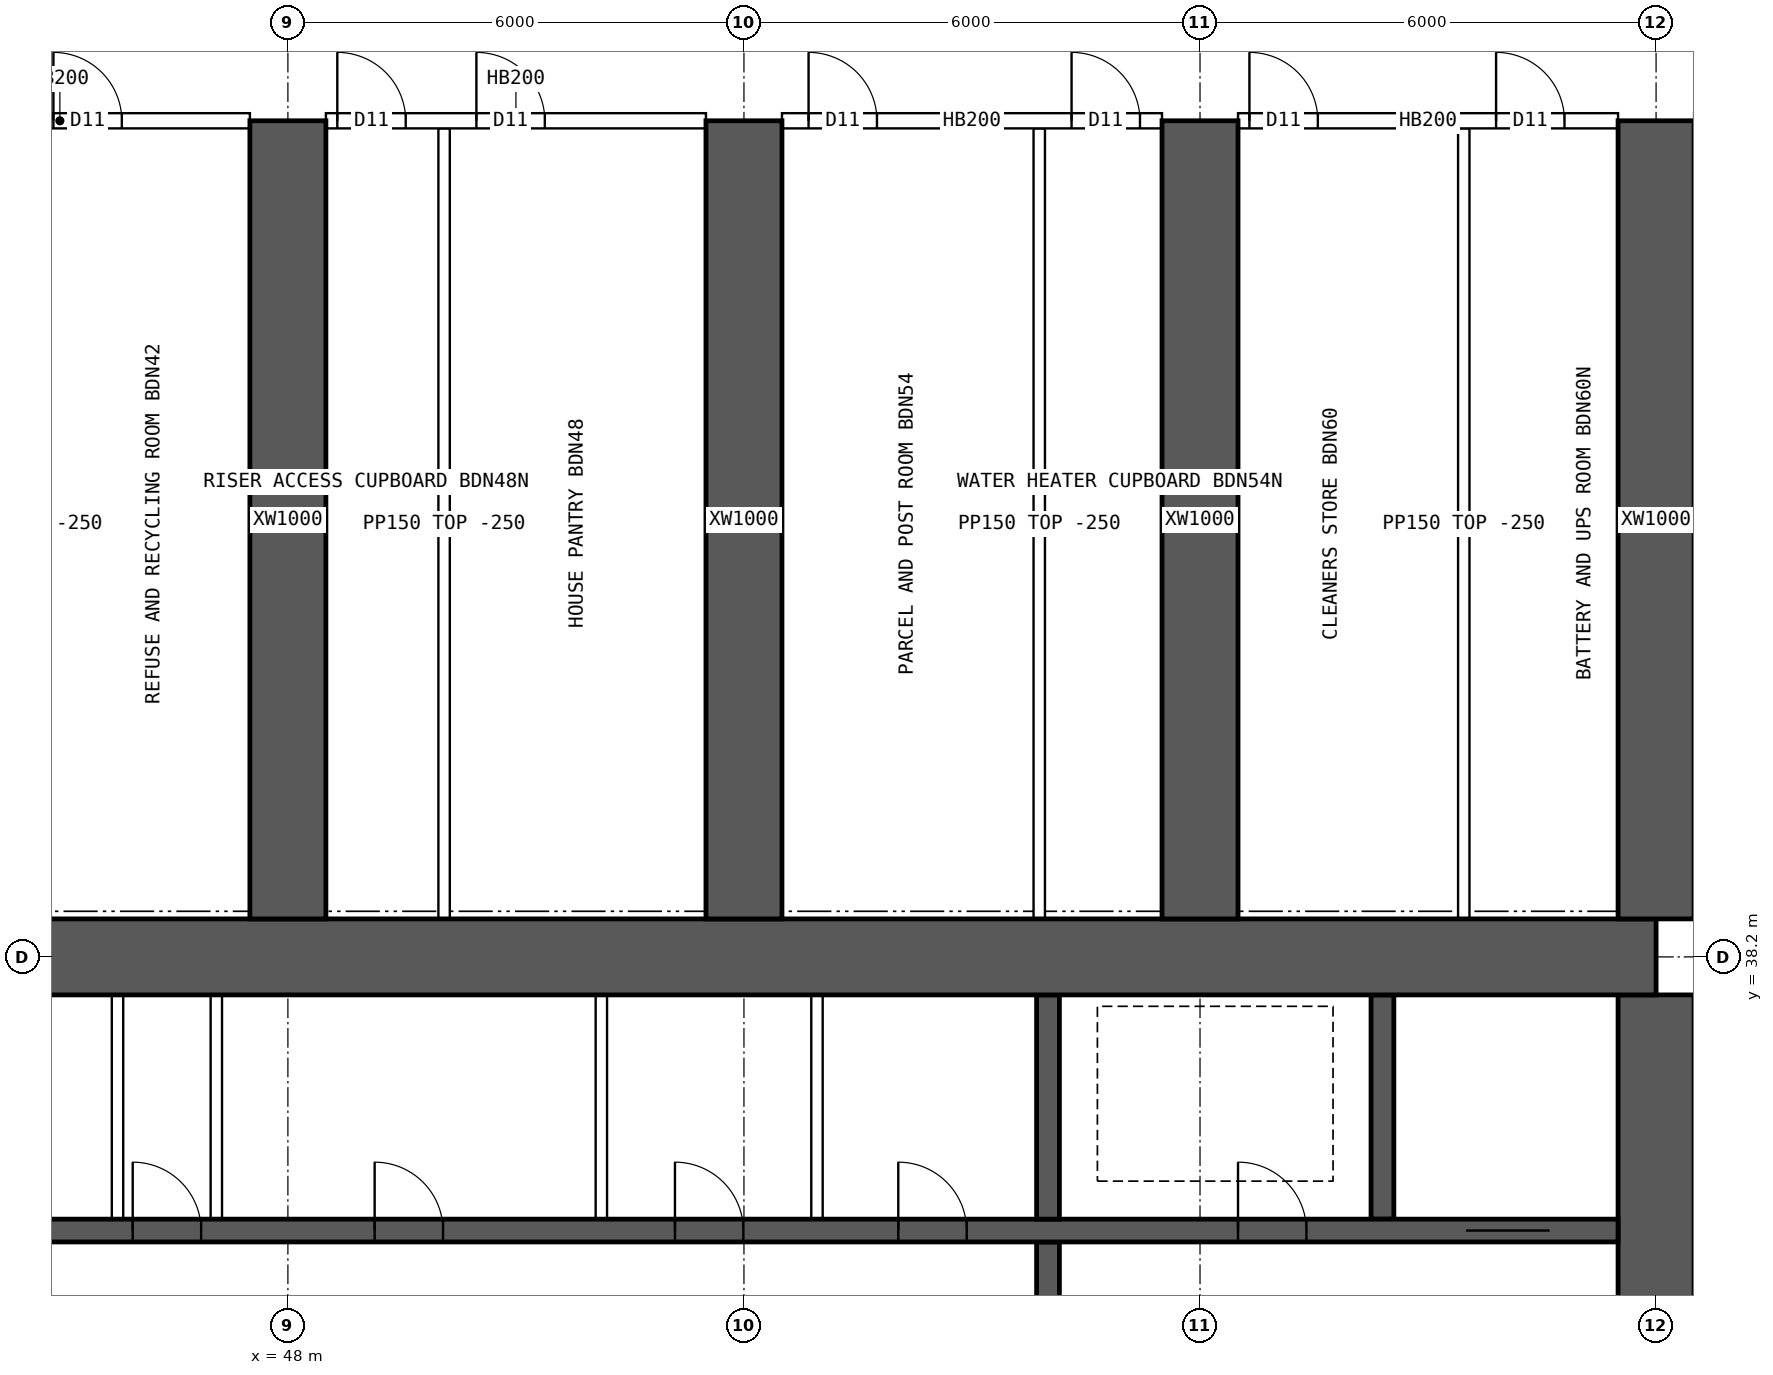
"""IFC4 building model, lengths in metres.
Left out: names, types, materials, properties, quantities, classifications, styles, units other than length and angle.
Written with IfcOpenShell. Run it as: python <this file> out.ifc"""

import sys

from ifc_helpers import new_model, si_unit, direction, frame, frame_2d, origin, place, context, subcontext, project, spatial, rectangle, extrude, element, fill, save


model = new_model("IFC4")
c1 = context("Model", 3, precision=1e-05, world=origin(), true_north=direction((0.0, 1.0)))
c2 = subcontext(c1, "Body", "Model", "MODEL_VIEW")
j1 = project(units=[si_unit("LENGTHUNIT", "METRE"), si_unit("PLANEANGLEUNIT", "RADIAN")], contexts=[c1])
p1 = place(None, origin())
s1 = spatial("IfcSite", under=j1, at=p1, CompositionType="ELEMENT")
p2 = place(p1, origin())
s2 = spatial("IfcBuilding", under=s1, at=p2, CompositionType="ELEMENT")
p3 = place(p2, frame((0.0, 0.0, 46.45)))
s3 = spatial("IfcBuildingStorey", under=s2, at=p3, CompositionType="ELEMENT", Elevation=46.45)
p4 = place(p3, frame((18.0, 38.2, 0.0), z_axis=(0.0, 0.0, 1.0), x_axis=(1.0, 0.0, 0.0)))
e1 = element("IfcWall", 1, at=p4, inside=s3, PredefinedType="SHEAR", context=c2, shape_type="SweptSolid", body=[
    extrude(rectangle(XDim=48.0, YDim=1.0, at=frame_2d((24.0, 0.0))), origin(), (0.0, 0.0, 1.0), 3.75),
])
p5 = place(p3, frame((66.0, 26.3, 0.0), z_axis=(0.0, 0.0, 1.0), x_axis=(0.0, 1.0, 0.0)))
e2 = element("IfcWall", 2, at=p5, inside=s3, PredefinedType="SHEAR", context=c2, shape_type="SweptSolid", body=[
    extrude(rectangle(XDim=11.4, YDim=1.0, at=frame_2d((5.7, 0.0))), origin(), (0.0, 0.0, 1.0), 3.75),
])
p6 = place(p5, frame((5.0, 0.0, 0.0)))
e3 = element("IfcOpeningElement", 3, at=p6, cuts=e2, PredefinedType="OPENING", context=c2, shape_type="SweptSolid", body=[
    extrude(rectangle(XDim=1.2, YDim=2.1, at=frame_2d((0.6, 1.05))), frame((0.0, 0.51, 0.0), z_axis=(0.0, -1.0, 0.0), x_axis=(1.0, 0.0, 0.0)), (0.0, 0.0, 1.0), 1.02),
])
p7 = place(p3, frame((18.5, 34.6, 0.0), z_axis=(0.0, 0.0, 1.0), x_axis=(1.0, 0.0, 0.0)))
e4 = element("IfcWall", 4, at=p7, inside=s3, PredefinedType="SHEAR", context=c2, shape_type="SweptSolid", body=[
    extrude(rectangle(XDim=47.0, YDim=0.3, at=frame_2d((23.5, 0.0))), origin(), (0.0, 0.0, 1.0), 3.75),
])
p8 = place(p7, frame((0.9, 0.0, 0.0)))
e5 = element("IfcOpeningElement", 5, at=p8, cuts=e4, PredefinedType="OPENING", context=c2, shape_type="SweptSolid", body=[
    extrude(rectangle(XDim=1.1, YDim=2.1, at=frame_2d((0.55, 1.05))), frame((0.0, 0.16, 0.0), z_axis=(0.0, -1.0, 0.0), x_axis=(1.0, 0.0, 0.0)), (0.0, 0.0, 1.0), 0.32),
])
p9 = place(p7, frame((45.0, 0.0, 0.0)))
e6 = element("IfcOpeningElement", 6, at=p9, cuts=e4, PredefinedType="OPENING", context=c2, shape_type="SweptSolid", body=[
    extrude(rectangle(XDim=1.1, YDim=2.1, at=frame_2d((0.55, 1.05))), frame((0.0, 0.16, 0.0), z_axis=(0.0, -1.0, 0.0), x_axis=(1.0, 0.0, 0.0)), (0.0, 0.0, 1.0), 0.32),
])
p10 = place(p7, frame((4.1, 0.0, 0.0)))
e7 = element("IfcOpeningElement", 7, at=p10, cuts=e4, PredefinedType="OPENING", context=c2, shape_type="SweptSolid", body=[
    extrude(rectangle(XDim=0.9, YDim=2.1, at=frame_2d((0.45, 1.05))), frame((0.0, 0.16, 0.0), z_axis=(0.0, -1.0, 0.0), x_axis=(1.0, 0.0, 0.0)), (0.0, 0.0, 1.0), 0.32),
])
p11 = place(p7, frame((42.0, 0.0, 0.0)))
e8 = element("IfcOpeningElement", 8, at=p11, cuts=e4, PredefinedType="OPENING", context=c2, shape_type="SweptSolid", body=[
    extrude(rectangle(XDim=0.9, YDim=2.1, at=frame_2d((0.45, 1.05))), frame((0.0, 0.16, 0.0), z_axis=(0.0, -1.0, 0.0), x_axis=(1.0, 0.0, 0.0)), (0.0, 0.0, 1.0), 0.32),
])
p12 = place(p7, frame((8.875, 0.0, 0.0)))
e9 = element("IfcOpeningElement", 9, at=p12, cuts=e4, PredefinedType="OPENING", context=c2, shape_type="SweptSolid", body=[
    extrude(rectangle(XDim=0.9, YDim=2.1, at=frame_2d((0.45, 1.05))), frame((0.0, 0.16, 0.0), z_axis=(0.0, -1.0, 0.0), x_axis=(1.0, 0.0, 0.0)), (0.0, 0.0, 1.0), 0.32),
])
p13 = place(p7, frame((12.849, 0.0, 0.0)))
e10 = element("IfcOpeningElement", 10, at=p13, cuts=e4, PredefinedType="OPENING", context=c2, shape_type="SweptSolid", body=[
    extrude(rectangle(XDim=0.9, YDim=2.1, at=frame_2d((0.45, 1.05))), frame((0.0, 0.16, 0.0), z_axis=(0.0, -1.0, 0.0), x_axis=(1.0, 0.0, 0.0)), (0.0, 0.0, 1.0), 0.32),
])
p14 = place(p7, frame((16.496, 0.0, 0.0)))
e11 = element("IfcOpeningElement", 11, at=p14, cuts=e4, PredefinedType="OPENING", context=c2, shape_type="SweptSolid", body=[
    extrude(rectangle(XDim=0.9, YDim=2.1, at=frame_2d((0.45, 1.05))), frame((0.0, 0.16, 0.0), z_axis=(0.0, -1.0, 0.0), x_axis=(1.0, 0.0, 0.0)), (0.0, 0.0, 1.0), 0.32),
])
p15 = place(p7, frame((20.255, 0.0, 0.0)))
e12 = element("IfcOpeningElement", 12, at=p15, cuts=e4, PredefinedType="OPENING", context=c2, shape_type="SweptSolid", body=[
    extrude(rectangle(XDim=0.9, YDim=2.1, at=frame_2d((0.45, 1.05))), frame((0.0, 0.16, 0.0), z_axis=(0.0, -1.0, 0.0), x_axis=(1.0, 0.0, 0.0)), (0.0, 0.0, 1.0), 0.32),
])
p16 = place(p7, frame((24.661, 0.0, 0.0)))
e13 = element("IfcOpeningElement", 13, at=p16, cuts=e4, PredefinedType="OPENING", context=c2, shape_type="SweptSolid", body=[
    extrude(rectangle(XDim=0.9, YDim=2.1, at=frame_2d((0.45, 1.05))), frame((0.0, 0.16, 0.0), z_axis=(0.0, -1.0, 0.0), x_axis=(1.0, 0.0, 0.0)), (0.0, 0.0, 1.0), 0.32),
])
p17 = place(p7, frame((27.458, 0.0, 0.0)))
e14 = element("IfcOpeningElement", 14, at=p17, cuts=e4, PredefinedType="OPENING", context=c2, shape_type="SweptSolid", body=[
    extrude(rectangle(XDim=0.9, YDim=2.1, at=frame_2d((0.45, 1.05))), frame((0.0, 0.16, 0.0), z_axis=(0.0, -1.0, 0.0), x_axis=(1.0, 0.0, 0.0)), (0.0, 0.0, 1.0), 0.32),
])
p18 = place(p7, frame((30.641, 0.0, 0.0)))
e15 = element("IfcOpeningElement", 15, at=p18, cuts=e4, PredefinedType="OPENING", context=c2, shape_type="SweptSolid", body=[
    extrude(rectangle(XDim=0.9, YDim=2.1, at=frame_2d((0.45, 1.05))), frame((0.0, 0.16, 0.0), z_axis=(0.0, -1.0, 0.0), x_axis=(1.0, 0.0, 0.0)), (0.0, 0.0, 1.0), 0.32),
])
p19 = place(p7, frame((34.592, 0.0, 0.0)))
e16 = element("IfcOpeningElement", 16, at=p19, cuts=e4, PredefinedType="OPENING", context=c2, shape_type="SweptSolid", body=[
    extrude(rectangle(XDim=0.9, YDim=2.1, at=frame_2d((0.45, 1.05))), frame((0.0, 0.16, 0.0), z_axis=(0.0, -1.0, 0.0), x_axis=(1.0, 0.0, 0.0)), (0.0, 0.0, 1.0), 0.32),
])
p20 = place(p7, frame((37.53, 0.0, 0.0)))
e17 = element("IfcOpeningElement", 17, at=p20, cuts=e4, PredefinedType="OPENING", context=c2, shape_type="SweptSolid", body=[
    extrude(rectangle(XDim=0.9, YDim=2.1, at=frame_2d((0.45, 1.05))), frame((0.0, 0.16, 0.0), z_axis=(0.0, -1.0, 0.0), x_axis=(1.0, 0.0, 0.0)), (0.0, 0.0, 1.0), 0.32),
])
p21 = place(p3, frame((58.0, 30.55, 0.0), z_axis=(0.0, 0.0, 1.0), x_axis=(0.0, 1.0, 0.0)))
e18 = element("IfcWall", 18, at=p21, inside=s3, PredefinedType="SHEAR", context=c2, shape_type="SweptSolid", body=[
    extrude(rectangle(XDim=3.9, YDim=0.3, at=frame_2d((1.95, 0.0))), origin(), (0.0, 0.0, 1.0), 3.75),
])
p22 = place(p21, frame((1.4, 0.0, 0.0)))
e19 = element("IfcOpeningElement", 19, at=p22, cuts=e18, PredefinedType="OPENING", context=c2, shape_type="SweptSolid", body=[
    extrude(rectangle(XDim=1.2, YDim=2.1, at=frame_2d((0.6, 1.05))), frame((0.0, 0.16, 0.0), z_axis=(0.0, -1.0, 0.0), x_axis=(1.0, 0.0, 0.0)), (0.0, 0.0, 1.0), 0.32),
])
for number, where, z_axis, x_axis in (
    (20, (62.4, 34.75, 0.0), (0.0, 0.0, 1.0), (0.0, 1.0, 0.0)),
    (21, (58.0, 34.75, 0.0), (0.0, 0.0, 1.0), (0.0, 1.0, 0.0)),
):
    element("IfcWall", number, at=place(p3, frame(where, z_axis=z_axis, x_axis=x_axis)), inside=s3, PredefinedType="SHEAR", context=c2, shape_type="SweptSolid", body=[
        extrude(rectangle(XDim=2.95, YDim=0.3, at=frame_2d((1.475, 0.0))), origin(), (0.0, 0.0, 1.0), 3.75),
    ])
for number, where, z_axis, x_axis in (
    (22, (48.0, 38.7, 0.0), (0.0, 0.0, 1.0), (0.0, 1.0, 0.0)),
    (23, (54.0, 38.7, 0.0), (0.0, 0.0, 1.0), (0.0, 1.0, 0.0)),
    (24, (60.0, 38.7, 0.0), (0.0, 0.0, 1.0), (0.0, 1.0, 0.0)),
    (25, (66.0, 38.7, 0.0), (0.0, 0.0, 1.0), (0.0, 1.0, 0.0)),
):
    element("IfcWall", number, at=place(p3, frame(where, z_axis=z_axis, x_axis=x_axis)), inside=s3, PredefinedType="SHEAR", context=c2, shape_type="SweptSolid", body=[
        extrude(rectangle(XDim=10.5, YDim=1.0, at=frame_2d((5.25, 0.0))), origin(), (0.0, 0.0, 1.0), 3.75),
    ])
for number, where, z_axis, x_axis in (
    (26, (45.758, 34.75, 0.0), (0.0, 0.0, 1.0), (0.0, 1.0, 0.0)),
    (27, (47.058, 34.75, 0.0), (0.0, 0.0, 1.0), (0.0, 1.0, 0.0)),
    (28, (52.124, 34.75, 0.0), (0.0, 0.0, 1.0), (0.0, 1.0, 0.0)),
    (29, (54.961, 34.75, 0.0), (0.0, 0.0, 1.0), (0.0, 1.0, 0.0)),
):
    element("IfcWall", number, at=place(p3, frame(where, z_axis=z_axis, x_axis=x_axis)), inside=s3, PredefinedType="SOLIDWALL", context=c2, shape_type="SweptSolid", body=[
        extrude(rectangle(XDim=2.95, YDim=0.15, at=frame_2d((1.475, 0.0))), origin(), (0.0, 0.0, 1.0), 3.5),
    ])
p23 = place(p3, frame((42.5, 49.2, 0.0), z_axis=(0.0, 0.0, 1.0), x_axis=(1.0, 0.0, 0.0)))
e30 = element("IfcWall", 30, at=p23, inside=s3, PredefinedType="SOLIDWALL", context=c2, shape_type="SweptSolid", body=[
    extrude(rectangle(XDim=5.0, YDim=0.2, at=frame_2d((2.5, 0.0))), origin(), (0.0, 0.0, 1.0), 3.5),
])
p24 = place(p23, frame((0.35, 0.0, 0.0)))
e31 = element("IfcOpeningElement", 31, at=p24, cuts=e30, PredefinedType="OPENING", context=c2, shape_type="SweptSolid", body=[
    extrude(rectangle(XDim=0.9, YDim=2.1, at=frame_2d((0.45, 1.05))), frame((0.0, 0.11, 0.0), z_axis=(0.0, -1.0, 0.0), x_axis=(1.0, 0.0, 0.0)), (0.0, 0.0, 1.0), 0.22),
])
p25 = place(p23, frame((2.415, 0.0, 0.0)))
e32 = element("IfcOpeningElement", 32, at=p25, cuts=e30, PredefinedType="OPENING", context=c2, shape_type="SweptSolid", body=[
    extrude(rectangle(XDim=0.9, YDim=2.1, at=frame_2d((0.45, 1.05))), frame((0.0, 0.11, 0.0), z_axis=(0.0, -1.0, 0.0), x_axis=(1.0, 0.0, 0.0)), (0.0, 0.0, 1.0), 0.22),
])
p26 = place(p3, frame((48.5, 49.2, 0.0), z_axis=(0.0, 0.0, 1.0), x_axis=(1.0, 0.0, 0.0)))
e33 = element("IfcWall", 33, at=p26, inside=s3, PredefinedType="SOLIDWALL", context=c2, shape_type="SweptSolid", body=[
    extrude(rectangle(XDim=5.0, YDim=0.2, at=frame_2d((2.5, 0.0))), origin(), (0.0, 0.0, 1.0), 3.5),
])
p27 = place(p26, frame((0.15, 0.0, 0.0)))
e34 = element("IfcOpeningElement", 34, at=p27, cuts=e33, PredefinedType="OPENING", context=c2, shape_type="SweptSolid", body=[
    extrude(rectangle(XDim=0.9, YDim=2.1, at=frame_2d((0.45, 1.05))), frame((0.0, 0.11, 0.0), z_axis=(0.0, -1.0, 0.0), x_axis=(1.0, 0.0, 0.0)), (0.0, 0.0, 1.0), 0.22),
])
p28 = place(p26, frame((1.98, 0.0, 0.0)))
e35 = element("IfcOpeningElement", 35, at=p28, cuts=e33, PredefinedType="OPENING", context=c2, shape_type="SweptSolid", body=[
    extrude(rectangle(XDim=0.9, YDim=2.1, at=frame_2d((0.45, 1.05))), frame((0.0, 0.11, 0.0), z_axis=(0.0, -1.0, 0.0), x_axis=(1.0, 0.0, 0.0)), (0.0, 0.0, 1.0), 0.22),
])
p29 = place(p3, frame((54.5, 49.2, 0.0), z_axis=(0.0, 0.0, 1.0), x_axis=(1.0, 0.0, 0.0)))
e36 = element("IfcWall", 36, at=p29, inside=s3, PredefinedType="SOLIDWALL", context=c2, shape_type="SweptSolid", body=[
    extrude(rectangle(XDim=5.0, YDim=0.2, at=frame_2d((2.5, 0.0))), origin(), (0.0, 0.0, 1.0), 3.5),
])
p30 = place(p29, frame((0.35, 0.0, 0.0)))
e37 = element("IfcOpeningElement", 37, at=p30, cuts=e36, PredefinedType="OPENING", context=c2, shape_type="SweptSolid", body=[
    extrude(rectangle(XDim=0.9, YDim=2.1, at=frame_2d((0.45, 1.05))), frame((0.0, 0.11, 0.0), z_axis=(0.0, -1.0, 0.0), x_axis=(1.0, 0.0, 0.0)), (0.0, 0.0, 1.0), 0.22),
])
p31 = place(p29, frame((3.81, 0.0, 0.0)))
e38 = element("IfcOpeningElement", 38, at=p31, cuts=e36, PredefinedType="OPENING", context=c2, shape_type="SweptSolid", body=[
    extrude(rectangle(XDim=0.9, YDim=2.1, at=frame_2d((0.45, 1.05))), frame((0.0, 0.11, 0.0), z_axis=(0.0, -1.0, 0.0), x_axis=(1.0, 0.0, 0.0)), (0.0, 0.0, 1.0), 0.22),
])
p32 = place(p3, frame((60.5, 49.2, 0.0), z_axis=(0.0, 0.0, 1.0), x_axis=(1.0, 0.0, 0.0)))
e39 = element("IfcWall", 39, at=p32, inside=s3, PredefinedType="SOLIDWALL", context=c2, shape_type="SweptSolid", body=[
    extrude(rectangle(XDim=5.0, YDim=0.2, at=frame_2d((2.5, 0.0))), origin(), (0.0, 0.0, 1.0), 3.5),
])
p33 = place(p32, frame((0.15, 0.0, 0.0)))
e40 = element("IfcOpeningElement", 40, at=p33, cuts=e39, PredefinedType="OPENING", context=c2, shape_type="SweptSolid", body=[
    extrude(rectangle(XDim=0.9, YDim=2.1, at=frame_2d((0.45, 1.05))), frame((0.0, 0.11, 0.0), z_axis=(0.0, -1.0, 0.0), x_axis=(1.0, 0.0, 0.0)), (0.0, 0.0, 1.0), 0.22),
])
p34 = place(p32, frame((3.395, 0.0, 0.0)))
e41 = element("IfcOpeningElement", 41, at=p34, cuts=e39, PredefinedType="OPENING", context=c2, shape_type="SweptSolid", body=[
    extrude(rectangle(XDim=0.9, YDim=2.1, at=frame_2d((0.45, 1.05))), frame((0.0, 0.11, 0.0), z_axis=(0.0, -1.0, 0.0), x_axis=(1.0, 0.0, 0.0)), (0.0, 0.0, 1.0), 0.22),
])
for number, where, z_axis, x_axis in (
    (42, (50.055, 38.7, 0.0), (0.0, 0.0, 1.0), (0.0, 1.0, 0.0)),
    (43, (57.885, 38.7, 0.0), (0.0, 0.0, 1.0), (0.0, 1.0, 0.0)),
    (44, (63.47, 38.7, 0.0), (0.0, 0.0, 1.0), (0.0, 1.0, 0.0)),
):
    element("IfcWall", number, at=place(p3, frame(where, z_axis=z_axis, x_axis=x_axis)), inside=s3, PredefinedType="PARTITIONING", context=c2, shape_type="SweptSolid", body=[
        extrude(rectangle(XDim=10.4, YDim=0.15, at=frame_2d((5.2, 0.0))), origin(), (0.0, 0.0, 1.0), 3.5),
    ])
p35 = place(p9, origin())
e45 = element("IfcDoor", 45, at=p35, inside=s3, OperationType="DOUBLE_DOOR_SLIDING", PredefinedType="DOOR", context=c2, shape_type="SweptSolid", body=[
    extrude(rectangle(XDim=1.1, YDim=2.1, at=frame_2d((0.55, 1.05))), frame((0.0, 0.025, 0.0), z_axis=(0.0, -1.0, 0.0), x_axis=(1.0, 0.0, 0.0)), (0.0, 0.0, 1.0), 0.05),
])
fill(e6, e45)
p36 = place(p11, origin())
e46 = element("IfcDoor", 46, at=p36, inside=s3, OperationType="SINGLE_SWING_LEFT", PredefinedType="DOOR", context=c2, shape_type="SweptSolid", body=[
    extrude(rectangle(XDim=0.9, YDim=2.1, at=frame_2d((0.45, 1.05))), frame((0.0, 0.025, 0.0), z_axis=(0.0, -1.0, 0.0), x_axis=(1.0, 0.0, 0.0)), (0.0, 0.0, 1.0), 0.05),
])
fill(e8, e46)
p37 = place(p17, origin())
e47 = element("IfcDoor", 47, at=p37, inside=s3, OperationType="SINGLE_SWING_LEFT", PredefinedType="DOOR", context=c2, shape_type="SweptSolid", body=[
    extrude(rectangle(XDim=0.9, YDim=2.1, at=frame_2d((0.45, 1.05))), frame((0.0, 0.025, 0.0), z_axis=(0.0, -1.0, 0.0), x_axis=(1.0, 0.0, 0.0)), (0.0, 0.0, 1.0), 0.05),
])
fill(e14, e47)
p38 = place(p18, origin())
e48 = element("IfcDoor", 48, at=p38, inside=s3, OperationType="SINGLE_SWING_LEFT", PredefinedType="DOOR", context=c2, shape_type="SweptSolid", body=[
    extrude(rectangle(XDim=0.9, YDim=2.1, at=frame_2d((0.45, 1.05))), frame((0.0, 0.025, 0.0), z_axis=(0.0, -1.0, 0.0), x_axis=(1.0, 0.0, 0.0)), (0.0, 0.0, 1.0), 0.05),
])
fill(e15, e48)
p39 = place(p19, origin())
e49 = element("IfcDoor", 49, at=p39, inside=s3, OperationType="SINGLE_SWING_LEFT", PredefinedType="DOOR", context=c2, shape_type="SweptSolid", body=[
    extrude(rectangle(XDim=0.9, YDim=2.1, at=frame_2d((0.45, 1.05))), frame((0.0, 0.025, 0.0), z_axis=(0.0, -1.0, 0.0), x_axis=(1.0, 0.0, 0.0)), (0.0, 0.0, 1.0), 0.05),
])
fill(e16, e49)
p40 = place(p20, origin())
e50 = element("IfcDoor", 50, at=p40, inside=s3, OperationType="SINGLE_SWING_LEFT", PredefinedType="DOOR", context=c2, shape_type="SweptSolid", body=[
    extrude(rectangle(XDim=0.9, YDim=2.1, at=frame_2d((0.45, 1.05))), frame((0.0, 0.025, 0.0), z_axis=(0.0, -1.0, 0.0), x_axis=(1.0, 0.0, 0.0)), (0.0, 0.0, 1.0), 0.05),
])
fill(e17, e50)
p41 = place(p25, origin())
e51 = element("IfcDoor", 51, at=p41, inside=s3, OperationType="SINGLE_SWING_LEFT", PredefinedType="DOOR", context=c2, shape_type="SweptSolid", body=[
    extrude(rectangle(XDim=0.9, YDim=2.1, at=frame_2d((0.45, 1.05))), frame((0.0, 0.025, 0.0), z_axis=(0.0, -1.0, 0.0), x_axis=(1.0, 0.0, 0.0)), (0.0, 0.0, 1.0), 0.05),
])
fill(e32, e51)
p42 = place(p27, origin())
e52 = element("IfcDoor", 52, at=p42, inside=s3, OperationType="SINGLE_SWING_LEFT", PredefinedType="DOOR", context=c2, shape_type="SweptSolid", body=[
    extrude(rectangle(XDim=0.9, YDim=2.1, at=frame_2d((0.45, 1.05))), frame((0.0, 0.025, 0.0), z_axis=(0.0, -1.0, 0.0), x_axis=(1.0, 0.0, 0.0)), (0.0, 0.0, 1.0), 0.05),
])
fill(e34, e52)
p43 = place(p28, origin())
e53 = element("IfcDoor", 53, at=p43, inside=s3, OperationType="SINGLE_SWING_LEFT", PredefinedType="DOOR", context=c2, shape_type="SweptSolid", body=[
    extrude(rectangle(XDim=0.9, YDim=2.1, at=frame_2d((0.45, 1.05))), frame((0.0, 0.025, 0.0), z_axis=(0.0, -1.0, 0.0), x_axis=(1.0, 0.0, 0.0)), (0.0, 0.0, 1.0), 0.05),
])
fill(e35, e53)
p44 = place(p30, origin())
e54 = element("IfcDoor", 54, at=p44, inside=s3, OperationType="SINGLE_SWING_LEFT", PredefinedType="DOOR", context=c2, shape_type="SweptSolid", body=[
    extrude(rectangle(XDim=0.9, YDim=2.1, at=frame_2d((0.45, 1.05))), frame((0.0, 0.025, 0.0), z_axis=(0.0, -1.0, 0.0), x_axis=(1.0, 0.0, 0.0)), (0.0, 0.0, 1.0), 0.05),
])
fill(e37, e54)
p45 = place(p31, origin())
e55 = element("IfcDoor", 55, at=p45, inside=s3, OperationType="SINGLE_SWING_LEFT", PredefinedType="DOOR", context=c2, shape_type="SweptSolid", body=[
    extrude(rectangle(XDim=0.9, YDim=2.1, at=frame_2d((0.45, 1.05))), frame((0.0, 0.025, 0.0), z_axis=(0.0, -1.0, 0.0), x_axis=(1.0, 0.0, 0.0)), (0.0, 0.0, 1.0), 0.05),
])
fill(e38, e55)
p46 = place(p33, origin())
e56 = element("IfcDoor", 56, at=p46, inside=s3, OperationType="SINGLE_SWING_LEFT", PredefinedType="DOOR", context=c2, shape_type="SweptSolid", body=[
    extrude(rectangle(XDim=0.9, YDim=2.1, at=frame_2d((0.45, 1.05))), frame((0.0, 0.025, 0.0), z_axis=(0.0, -1.0, 0.0), x_axis=(1.0, 0.0, 0.0)), (0.0, 0.0, 1.0), 0.05),
])
fill(e40, e56)
p47 = place(p34, origin())
e57 = element("IfcDoor", 57, at=p47, inside=s3, OperationType="SINGLE_SWING_LEFT", PredefinedType="DOOR", context=c2, shape_type="SweptSolid", body=[
    extrude(rectangle(XDim=0.9, YDim=2.1, at=frame_2d((0.45, 1.05))), frame((0.0, 0.025, 0.0), z_axis=(0.0, -1.0, 0.0), x_axis=(1.0, 0.0, 0.0)), (0.0, 0.0, 1.0), 0.05),
])
fill(e41, e57)
save(model, sys.argv[1])
